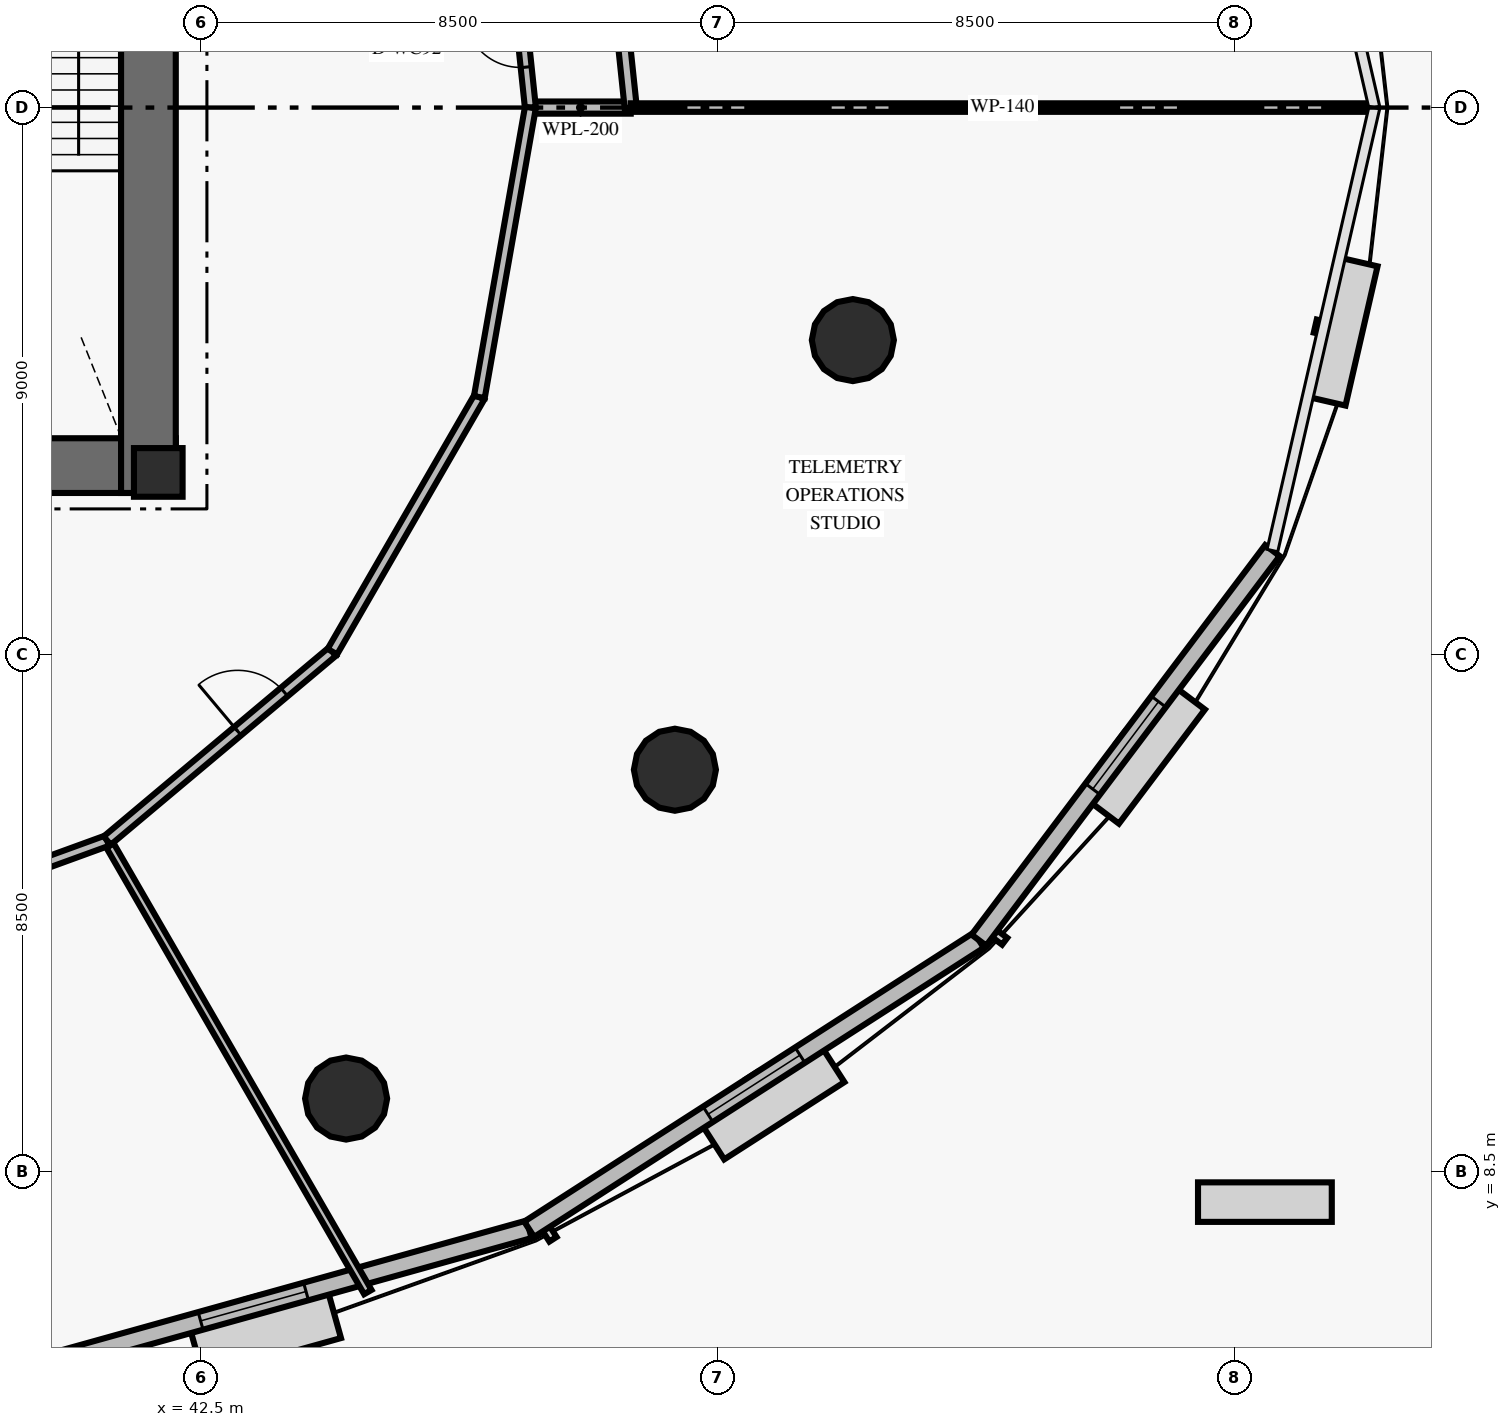
"""IFC4 building model, lengths in metres.
Left out: names, types, materials, properties, quantities, classifications, styles, units other than length and angle.
Written with IfcOpenShell. Run it as: python <this file> out.ifc"""

import sys

from ifc_helpers import new_model, si_unit, direction, frame, frame_2d, origin, origin_2d, place, context, subcontext, project, spatial, rectangle, circle, extrude, element, fill, save


model = new_model("IFC4")
c1 = context("Model", 3, precision=1e-05, world=origin(), true_north=direction((0.0, 1.0)))
c2 = subcontext(c1, "Body", "Model", "MODEL_VIEW")
j1 = project(units=[si_unit("LENGTHUNIT", "METRE"), si_unit("PLANEANGLEUNIT", "RADIAN")], contexts=[c1])
p1 = place(None, origin())
s1 = spatial("IfcSite", under=j1, at=p1, CompositionType="ELEMENT")
p2 = place(p1, origin())
s2 = spatial("IfcBuilding", under=s1, at=p2, CompositionType="ELEMENT")
p3 = place(p2, frame((0.0, 0.0, 30.0)))
s3 = spatial("IfcBuildingStorey", under=s2, at=p3, CompositionType="ELEMENT", Elevation=30.0)
p4 = place(p3, frame((25.922, 20.112, 0.0), z_axis=(0.0, 0.0, 1.0), x_axis=(1.0, 0.0, 0.0)))
e1 = element("IfcWall", 1, at=p4, inside=s3, PredefinedType="SHEAR", context=c2, shape_type="SweptSolid", body=[
    extrude(rectangle(XDim=16.166, YDim=0.9, at=frame_2d((8.083, 0.0))), origin(), (0.0, 0.0, 1.0), 4.2),
])
p5 = place(p3, frame((41.638, 19.662, 0.0), z_axis=(0.0, 0.0, 1.0), x_axis=(0.0, 1.0, 0.0)))
e2 = element("IfcWall", 2, at=p5, inside=s3, PredefinedType="SHEAR", context=c2, shape_type="SweptSolid", body=[
    extrude(rectangle(XDim=10.876, YDim=0.9, at=frame_2d((5.438, 0.0))), origin(), (0.0, 0.0, 1.0), 4.2),
])
p6 = place(p3, frame((41.8, 20.0, 0.0), z_axis=(0.0, 0.0, 1.0), x_axis=(1.0, 0.0, 0.0)))
e3 = element("IfcColumn", 3, at=p6, inside=s3, PredefinedType="PILASTER", context=c2, shape_type="SweptSolid", body=[
    extrude(rectangle(XDim=0.8, YDim=0.8, at=origin_2d()), origin(), (0.0, 0.0, 1.0), 4.2),
])
p7 = place(p3, frame((44.889, 9.703, -0.28), z_axis=(0.0, 0.0, 1.0), x_axis=(1.0, 0.0, 0.0)))
e4 = element("IfcColumn", 4, at=p7, inside=s3, PredefinedType="COLUMN", context=c2, shape_type="SweptSolid", body=[
    extrude(circle(Radius=0.675, at=origin_2d()), origin(), (0.0, 0.0, 1.0), 4.48),
])
for number, where, z_axis, x_axis in (
    (5, (50.297, 15.111, 0.0), (0.0, 0.0, 1.0), (1.0, 0.0, 0.0)),
    (6, (53.223, 22.176, 0.0), (0.0, 0.0, 1.0), (1.0, 0.0, 0.0)),
):
    element("IfcColumn", number, at=place(p3, frame(where, z_axis=z_axis, x_axis=x_axis)), inside=s3, PredefinedType="COLUMN", context=c2, shape_type="SweptSolid", body=[
        extrude(circle(Radius=0.675, at=origin_2d()), origin(), (0.0, 0.0, 1.0), 4.2),
    ])
p8 = place(p3, frame((38.827, 5.024, 0.0), z_axis=(0.0, 0.0, 1.0), x_axis=(0.963246695545, 0.268618323133, 0.0)))
e7 = element("IfcWall", 7, at=p8, inside=s3, PredefinedType="SOLIDWALL", context=c2, shape_type="SweptSolid", body=[
    extrude(rectangle(XDim=9.419, YDim=0.3, at=frame_2d((4.709, 0.0))), origin(), (0.0, 0.0, 1.0), 3.0),
])
p9 = place(p8, frame((3.809, 0.0, 0.8)))
e8 = element("IfcOpeningElement", 8, at=p9, cuts=e7, PredefinedType="OPENING", context=c2, shape_type="SweptSolid", body=[
    extrude(rectangle(XDim=1.8, YDim=1.95, at=frame_2d((0.9, 0.975))), frame((0.0, 0.16, 0.0), z_axis=(0.0, -1.0, 0.0), x_axis=(1.0, 0.0, 0.0)), (0.0, 0.0, 1.0), 0.32),
])
p10 = place(p3, frame((47.9, 7.554, 0.0), z_axis=(0.0, 0.0, 1.0), x_axis=(0.841162236031, 0.540782851685, 0.0)))
e9 = element("IfcWall", 9, at=p10, inside=s3, PredefinedType="SOLIDWALL", context=c2, shape_type="SweptSolid", body=[
    extrude(rectangle(XDim=8.792, YDim=0.3, at=frame_2d((4.396, 0.0))), origin(), (0.0, 0.0, 1.0), 3.0),
])
p11 = place(p10, frame((3.496, 0.0, 0.8)))
e10 = element("IfcOpeningElement", 10, at=p11, cuts=e9, PredefinedType="OPENING", context=c2, shape_type="SweptSolid", body=[
    extrude(rectangle(XDim=1.8, YDim=1.95, at=frame_2d((0.9, 0.975))), frame((0.0, 0.16, 0.0), z_axis=(0.0, -1.0, 0.0), x_axis=(1.0, 0.0, 0.0)), (0.0, 0.0, 1.0), 0.32),
])
p12 = place(p3, frame((55.296, 12.309, 0.0), z_axis=(0.0, 0.0, 1.0), x_axis=(0.601814793535, 0.798635683076, 0.0)))
e11 = element("IfcWall", 11, at=p12, inside=s3, PredefinedType="SOLIDWALL", context=c2, shape_type="SweptSolid", body=[
    extrude(rectangle(XDim=8.022, YDim=0.3, at=frame_2d((4.011, 0.0))), origin(), (0.0, 0.0, 1.0), 3.0),
])
p13 = place(p12, frame((3.111, 0.0, 0.8)))
e12 = element("IfcOpeningElement", 12, at=p13, cuts=e11, PredefinedType="OPENING", context=c2, shape_type="SweptSolid", body=[
    extrude(rectangle(XDim=1.8, YDim=1.95, at=frame_2d((0.9, 0.975))), frame((0.0, 0.16, 0.0), z_axis=(0.0, -1.0, 0.0), x_axis=(1.0, 0.0, 0.0)), (0.0, 0.0, 1.0), 0.32),
])
p14 = place(p3, frame((47.92, 26.0, 0.0), z_axis=(0.0, 0.0, 1.0), x_axis=(1.0, 0.0, 0.0)))
e13 = element("IfcWall", 13, at=p14, inside=s3, PredefinedType="PLUMBINGWALL", context=c2, shape_type="SweptSolid", body=[
    extrude(rectangle(XDim=1.65, YDim=0.2, at=frame_2d((0.825, 0.0))), origin(), (0.0, 0.0, 1.0), 2.67),
])
p15 = place(p3, frame((49.57, 26.0, 0.0), z_axis=(0.0, 0.0, 1.0), x_axis=(-0.104552041268, 0.994519416938, 0.0)))
e14 = element("IfcWall", 14, at=p15, inside=s3, PredefinedType="PLUMBINGWALL", context=c2, shape_type="SweptSolid", body=[
    extrude(rectangle(XDim=3.255, YDim=0.2, at=frame_2d((1.627, 0.0))), origin(), (0.0, 0.0, 1.0), 2.67),
])
p16 = place(p3, frame((47.92, 26.0, 0.0), z_axis=(0.0, 0.0, 1.0), x_axis=(-0.104536296253, 0.994521072057, 0.0)))
e15 = element("IfcWall", 15, at=p16, inside=s3, PredefinedType="PARTITIONING", context=c2, shape_type="SweptSolid", body=[
    extrude(rectangle(XDim=2.91, YDim=0.18, at=frame_2d((1.455, 0.0))), origin(), (0.0, 0.0, 1.0), 2.67),
])
p17 = place(p16, frame((0.669, 0.0, 0.0)))
e16 = element("IfcOpeningElement", 16, at=p17, cuts=e15, PredefinedType="OPENING", context=c2, shape_type="SweptSolid", body=[
    extrude(rectangle(XDim=0.92, YDim=2.1, at=frame_2d((0.46, 1.05))), frame((0.0, 0.1, 0.0), z_axis=(0.0, -1.0, 0.0), x_axis=(1.0, 0.0, 0.0)), (0.0, 0.0, 1.0), 0.2),
])
p18 = place(p3, frame((49.57, 26.0, 0.0), z_axis=(0.0, 0.0, 1.0), x_axis=(1.0, 0.0, 0.0)))
e17 = element("IfcWall", 17, at=p18, inside=s3, PredefinedType="PARTITIONING", context=c2, shape_type="SweptSolid", body=[
    extrude(rectangle(XDim=12.23, YDim=0.14, at=frame_2d((6.115, 0.0))), origin(), (0.0, 0.0, 1.0), 2.67),
])
p19 = place(p3, frame((40.96, 13.945, 0.0), z_axis=(0.0, 0.0, 1.0), x_axis=(0.500007596729, -0.866021017767, 0.0)))
e18 = element("IfcWall", 18, at=p19, inside=s3, PredefinedType="PARTITIONING", context=c2, shape_type="SweptSolid", body=[
    extrude(rectangle(XDim=8.573, YDim=0.14, at=frame_2d((4.286, 0.0))), origin(), (0.0, 0.0, 1.0), 2.67),
])
p20 = place(p3, frame((36.417, 12.292, 0.0), z_axis=(0.0, 0.0, 1.0), x_axis=(0.939699018122, 0.342002566277, 0.0)))
e19 = element("IfcWall", 19, at=p20, inside=s3, PredefinedType="PARTITIONING", context=c2, shape_type="SweptSolid", body=[
    extrude(rectangle(XDim=4.834, YDim=0.18, at=frame_2d((2.417, 0.0))), origin(), (0.0, 0.0, 1.0), 2.67),
])
p21 = place(p3, frame((40.96, 13.945, 0.0), z_axis=(0.0, 0.0, 1.0), x_axis=(0.766027093856, 0.642808285167, 0.0)))
e20 = element("IfcWall", 20, at=p21, inside=s3, PredefinedType="PARTITIONING", context=c2, shape_type="SweptSolid", body=[
    extrude(rectangle(XDim=4.834, YDim=0.18, at=frame_2d((2.417, 0.0))), origin(), (0.0, 0.0, 1.0), 2.67),
])
p22 = place(p21, frame((2.801, 0.0, 0.0)))
e21 = element("IfcOpeningElement", 21, at=p22, cuts=e20, PredefinedType="OPENING", context=c2, shape_type="SweptSolid", body=[
    extrude(rectangle(XDim=1.0, YDim=2.15, at=frame_2d((0.5, 1.075))), frame((0.0, 0.1, 0.0), z_axis=(0.0, -1.0, 0.0), x_axis=(1.0, 0.0, 0.0)), (0.0, 0.0, 1.0), 0.2),
])
p23 = place(p3, frame((44.663, 17.052, 0.0), z_axis=(0.0, 0.0, 1.0), x_axis=(0.500022634323, 0.866012335458, 0.0)))
e22 = element("IfcWall", 22, at=p23, inside=s3, PredefinedType="PARTITIONING", context=c2, shape_type="SweptSolid", body=[
    extrude(rectangle(XDim=4.834, YDim=0.18, at=frame_2d((2.417, 0.0))), origin(), (0.0, 0.0, 1.0), 2.67),
])
p24 = place(p3, frame((47.081, 21.239, 0.0), z_axis=(0.0, 0.0, 1.0), x_axis=(0.173621119757, 0.984812523669, 0.0)))
e23 = element("IfcWall", 23, at=p24, inside=s3, PredefinedType="PARTITIONING", context=c2, shape_type="SweptSolid", body=[
    extrude(rectangle(XDim=4.834, YDim=0.18, at=frame_2d((2.417, 0.0))), origin(), (0.0, 0.0, 1.0), 2.67),
])
p25 = place(p9, origin())
e24 = element("IfcWindow", 24, at=p25, inside=s3, PartitioningType="SINGLE_PANEL", PredefinedType="WINDOW", context=c2, shape_type="SweptSolid", body=[
    extrude(rectangle(XDim=1.8, YDim=1.95, at=frame_2d((0.9, 0.975))), frame((0.0, 0.03, 0.0), z_axis=(0.0, -1.0, 0.0), x_axis=(1.0, 0.0, 0.0)), (0.0, 0.0, 1.0), 0.06),
])
fill(e8, e24)
p26 = place(p11, origin())
e25 = element("IfcWindow", 25, at=p26, inside=s3, PartitioningType="SINGLE_PANEL", PredefinedType="WINDOW", context=c2, shape_type="SweptSolid", body=[
    extrude(rectangle(XDim=1.8, YDim=1.95, at=frame_2d((0.9, 0.975))), frame((0.0, 0.03, 0.0), z_axis=(0.0, -1.0, 0.0), x_axis=(1.0, 0.0, 0.0)), (0.0, 0.0, 1.0), 0.06),
])
fill(e10, e25)
p27 = place(p13, origin())
e26 = element("IfcWindow", 26, at=p27, inside=s3, PartitioningType="SINGLE_PANEL", PredefinedType="WINDOW", context=c2, shape_type="SweptSolid", body=[
    extrude(rectangle(XDim=1.8, YDim=1.95, at=frame_2d((0.9, 0.975))), frame((0.0, 0.03, 0.0), z_axis=(0.0, -1.0, 0.0), x_axis=(1.0, 0.0, 0.0)), (0.0, 0.0, 1.0), 0.06),
])
fill(e12, e26)
p28 = place(p17, origin())
e27 = element("IfcDoor", 27, at=p28, inside=s3, OperationType="SINGLE_SWING_RIGHT", PredefinedType="DOOR", context=c2, shape_type="SweptSolid", body=[
    extrude(rectangle(XDim=0.92, YDim=2.1, at=frame_2d((0.46, 1.05))), frame((0.0, 0.025, 0.0), z_axis=(0.0, -1.0, 0.0), x_axis=(1.0, 0.0, 0.0)), (0.0, 0.0, 1.0), 0.05),
])
fill(e16, e27)
p29 = place(p22, origin())
e28 = element("IfcDoor", 28, at=p29, inside=s3, OperationType="SINGLE_SWING_LEFT", PredefinedType="DOOR", context=c2, shape_type="SweptSolid", body=[
    extrude(rectangle(XDim=1.0, YDim=2.15, at=frame_2d((0.5, 1.075))), frame((0.0, 0.025, 0.0), z_axis=(0.0, -1.0, 0.0), x_axis=(1.0, 0.0, 0.0)), (0.0, 0.0, 1.0), 0.05),
])
fill(e21, e28)
save(model, sys.argv[1])
